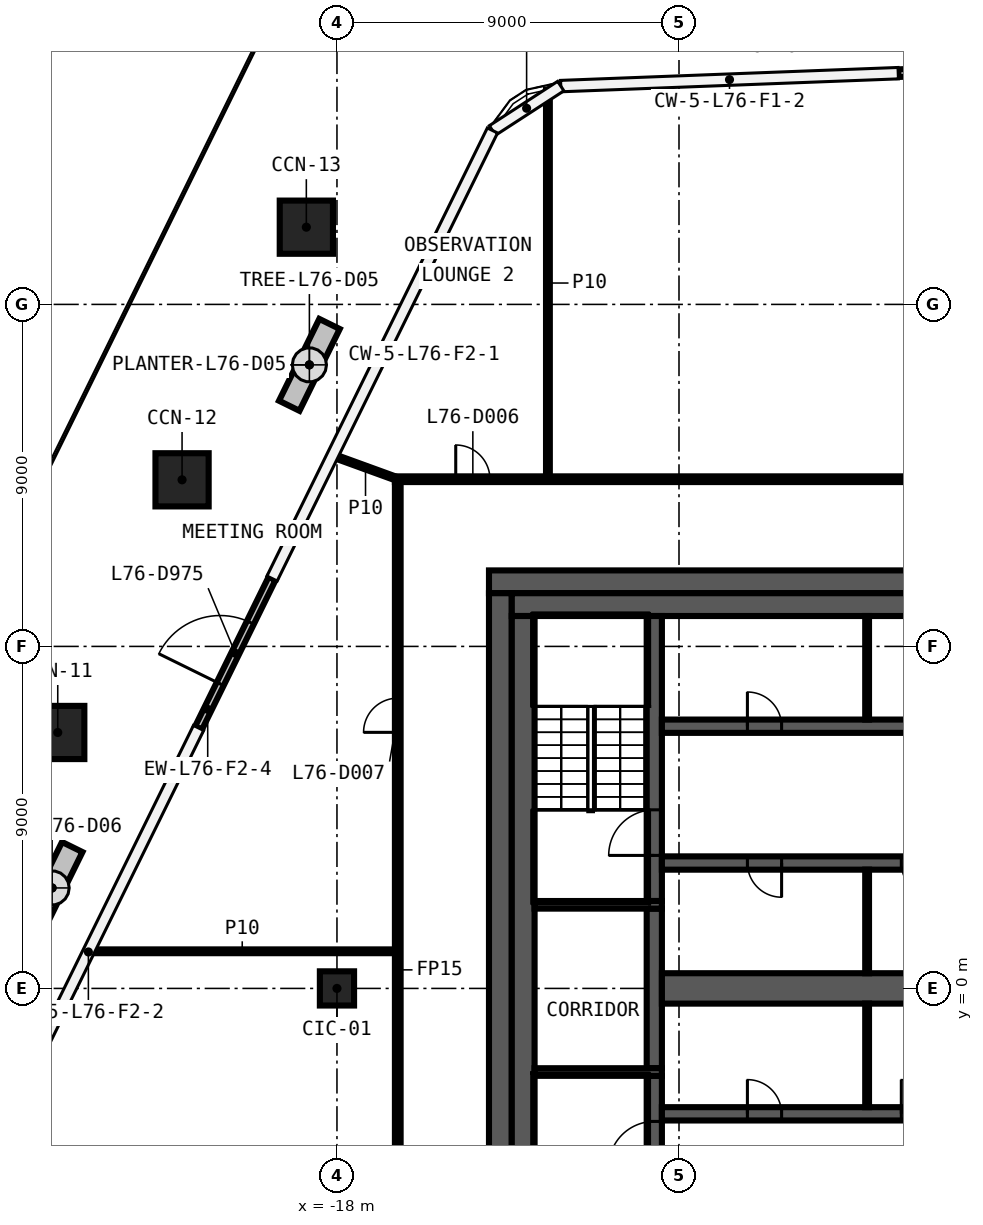
"""IFC4 building model, lengths in metres.
Left out: names, types, materials, properties, quantities, classifications, styles, units other than length and angle.
Written with IfcOpenShell. Run it as: python <this file> out.ifc"""

import sys

from ifc_helpers import new_model, si_unit, direction, frame, frame_2d, origin, origin_2d, place, context, subcontext, project, spatial, rectangle, hollow_rectangle, extrude, element, fill, save


model = new_model("IFC4")
c1 = context("Model", 3, precision=1e-05, world=origin(), true_north=direction((0.0, 1.0)))
c2 = subcontext(c1, "Body", "Model", "MODEL_VIEW")
j1 = project(units=[si_unit("LENGTHUNIT", "METRE"), si_unit("PLANEANGLEUNIT", "RADIAN")], contexts=[c1])
p1 = place(None, origin())
s1 = spatial("IfcSite", under=j1, at=p1, CompositionType="ELEMENT")
p2 = place(p1, origin())
s2 = spatial("IfcBuilding", under=s1, at=p2, CompositionType="ELEMENT")
p3 = place(p2, frame((0.0, 0.0, 353.0)))
s3 = spatial("IfcBuildingStorey", under=s2, at=p3, CompositionType="ELEMENT", Elevation=353.0)
p4 = place(p3, frame((-18.0, 0.0, 0.0), z_axis=(0.0, 0.0, 1.0), x_axis=(1.0, 0.0, 0.0)))
e1 = element("IfcColumn", 1, at=p4, inside=s3, PredefinedType="COLUMN", context=c2, shape_type="SweptSolid", body=[
    extrude(rectangle(XDim=0.9, YDim=0.9, at=origin_2d()), origin(), (0.0, 0.0, 1.0), 5.6),
])
for number, where, z_axis, x_axis in (
    (2, (-18.806, 20.032, 0.0), (0.0, 0.0, 1.0), (1.0, 0.0, 0.0)),
    (3, (-22.076, 13.384, 0.0), (0.0, 0.0, 1.0), (1.0, 0.0, 0.0)),
    (4, (-25.347, 6.735, 0.0), (0.0, 0.0, 1.0), (1.0, 0.0, 0.0)),
):
    element("IfcColumn", number, at=place(p3, frame(where, z_axis=z_axis, x_axis=x_axis)), inside=s3, PredefinedType="COLUMN", context=c2, shape_type="SweptSolid", body=[
        extrude(hollow_rectangle(XDim=1.4, YDim=1.4, WallThickness=0.06, at=origin_2d()), origin(), (0.0, 0.0, 1.0), 6.0),
    ])
p5 = place(p3, frame((-24.51, 0.977, 0.0), z_axis=(0.0, 0.0, 1.0), x_axis=(1.0, 0.0, 0.0)))
e5 = element("IfcWall", 5, at=p5, inside=s3, PredefinedType="PARTITIONING", context=c2, shape_type="SweptSolid", body=[
    extrude(rectangle(XDim=8.035, YDim=0.1, at=frame_2d((4.018, 0.0))), origin(), (0.0, 0.0, 1.0), 5.6),
])
p6 = place(p3, frame((-16.475, 13.4, 0.0), z_axis=(0.0, 0.0, 1.0), x_axis=(1.0, 0.0, 0.0)))
e6 = element("IfcWall", 6, at=p6, inside=s3, PredefinedType="PARTITIONING", context=c2, shape_type="SweptSolid", body=[
    extrude(rectangle(XDim=32.95, YDim=0.15, at=frame_2d((16.475, 0.0))), origin(), (0.0, 0.0, 1.0), 5.6),
])
p7 = place(p6, frame((16.926, 0.0, 0.0)))
e7 = element("IfcOpeningElement", 7, at=p7, cuts=e6, PredefinedType="OPENING", context=c2, shape_type="SweptSolid", body=[
    extrude(rectangle(XDim=0.9, YDim=2.1, at=frame_2d((0.45, 1.05))), frame((0.0, 0.085, 0.0), z_axis=(0.0, -1.0, 0.0), x_axis=(1.0, 0.0, 0.0)), (0.0, 0.0, 1.0), 0.17),
])
p8 = place(p6, frame((1.6, 0.0, 0.0)))
e8 = element("IfcOpeningElement", 8, at=p8, cuts=e6, PredefinedType="OPENING", context=c2, shape_type="SweptSolid", body=[
    extrude(rectangle(XDim=0.9, YDim=2.1, at=frame_2d((0.45, 1.05))), frame((0.0, 0.085, 0.0), z_axis=(0.0, -1.0, 0.0), x_axis=(1.0, 0.0, 0.0)), (0.0, 0.0, 1.0), 0.17),
])
p9 = place(p3, frame((-12.449, 13.475, 0.0), z_axis=(0.0, 0.0, 1.0), x_axis=(0.0, 1.0, 0.0)))
e9 = element("IfcWall", 9, at=p9, inside=s3, PredefinedType="PARTITIONING", context=c2, shape_type="SweptSolid", body=[
    extrude(rectangle(XDim=10.175, YDim=0.1, at=frame_2d((5.087, 0.0))), origin(), (0.0, 0.0, 1.0), 5.6),
])
p10 = place(p3, frame((-16.4, -13.325, 0.0), z_axis=(0.0, 0.0, 1.0), x_axis=(0.0, 1.0, 0.0)))
e10 = element("IfcWall", 10, at=p10, inside=s3, PredefinedType="PARTITIONING", context=c2, shape_type="SweptSolid", body=[
    extrude(rectangle(XDim=26.65, YDim=0.15, at=frame_2d((13.325, 0.0))), origin(), (0.0, 0.0, 1.0), 5.6),
])
p11 = place(p10, frame((6.664, 0.0, 0.0)))
e11 = element("IfcOpeningElement", 11, at=p11, cuts=e10, PredefinedType="OPENING", context=c2, shape_type="SweptSolid", body=[
    extrude(rectangle(XDim=0.9, YDim=2.1, at=frame_2d((0.45, 1.05))), frame((0.0, 0.085, 0.0), z_axis=(0.0, -1.0, 0.0), x_axis=(1.0, 0.0, 0.0)), (0.0, 0.0, 1.0), 0.17),
])
p12 = place(p10, frame((20.063, 0.0, 0.0)))
e12 = element("IfcOpeningElement", 12, at=p12, cuts=e10, PredefinedType="OPENING", context=c2, shape_type="SweptSolid", body=[
    extrude(rectangle(XDim=0.9, YDim=2.1, at=frame_2d((0.45, 1.05))), frame((0.0, 0.085, 0.0), z_axis=(0.0, -1.0, 0.0), x_axis=(1.0, 0.0, 0.0)), (0.0, 0.0, 1.0), 0.17),
])
p13 = place(p3, frame((-18.097, 14.016, 0.0), z_axis=(0.0, 0.0, 1.0), x_axis=(0.939892096891, -0.341471589158, 0.0)))
e13 = element("IfcWall", 13, at=p13, inside=s3, PredefinedType="PARTITIONING", context=c2, shape_type="SweptSolid", body=[
    extrude(rectangle(XDim=1.805, YDim=0.1, at=frame_2d((0.903, 0.0))), origin(), (0.0, 0.0, 1.0), 5.6),
])
p14 = place(p3, frame((-3.231, 24.085, 0.0), z_axis=(0.0, 0.0, 1.0), x_axis=(0.999267728071, 0.038262352715, 0.0)))
e14 = element("IfcWall", 14, at=p14, inside=s3, PredefinedType="SOLIDWALL", context=c2, shape_type="SweptSolid", body=[
    extrude(rectangle(XDim=4.447, YDim=0.2, at=frame_2d((2.224, 0.0))), origin(), (0.0, 0.0, 1.0), 5.6),
])
p15 = place(p14, frame((1.324, 0.0, 0.0)))
e15 = element("IfcOpeningElement", 15, at=p15, cuts=e14, PredefinedType="OPENING", context=c2, shape_type="SweptSolid", body=[
    extrude(rectangle(XDim=1.8, YDim=2.4, at=frame_2d((0.9, 1.2))), frame((0.0, 0.11, 0.0), z_axis=(0.0, -1.0, 0.0), x_axis=(1.0, 0.0, 0.0)), (0.0, 0.0, 1.0), 0.22),
])
p16 = place(p3, frame((-21.642, 6.854, 0.0), z_axis=(0.0, 0.0, 1.0), x_axis=(0.441343921146, 0.897338031774, 0.0)))
e16 = element("IfcWall", 16, at=p16, inside=s3, PredefinedType="SOLIDWALL", context=c2, shape_type="SweptSolid", body=[
    extrude(rectangle(XDim=4.383, YDim=0.2, at=frame_2d((2.191, 0.0))), origin(), (0.0, 0.0, 1.0), 5.6),
])
p17 = place(p16, frame((1.291, 0.0, 0.0)))
e17 = element("IfcOpeningElement", 17, at=p17, cuts=e16, PredefinedType="OPENING", context=c2, shape_type="SweptSolid", body=[
    extrude(rectangle(XDim=1.8, YDim=2.4, at=frame_2d((0.9, 1.2))), frame((0.0, 0.11, 0.0), z_axis=(0.0, -1.0, 0.0), x_axis=(1.0, 0.0, 0.0)), (0.0, 0.0, 1.0), 0.22),
])
for number, where, z_axis, x_axis in (
    (18, (-18.196, 17.486, 0.0), (0.0, 0.0, 1.0), (-0.441, -0.897, 0.0)),
    (19, (-24.966, 3.721, 0.0), (0.0, 0.0, 1.0), (-0.441, -0.897, 0.0)),
):
    element("IfcWall", number, at=place(p3, frame(where, z_axis=z_axis, x_axis=x_axis)), inside=s3, PredefinedType="SOLIDWALL", context=c2, shape_type="SweptSolid", body=[
        extrude(rectangle(XDim=2.4, YDim=0.6, at=frame_2d((1.2, 0.0))), origin(), (0.0, 0.0, 1.0), 0.42),
    ])
p18 = place(p3, frame((-14.0, 10.7, 0.0), z_axis=(0.0, 0.0, 1.0), x_axis=(1.0, 0.0, 0.0)))
e20 = element("IfcWall", 20, at=p18, inside=s3, PredefinedType="SHEAR", context=c2, shape_type="SweptSolid", body=[
    extrude(rectangle(XDim=28.0, YDim=0.6, at=frame_2d((14.0, 0.0))), origin(), (0.0, 0.0, 1.0), 5.6),
])
p19 = place(p18, frame((15.9, 0.0, 0.0)))
e21 = element("IfcOpeningElement", 21, at=p19, cuts=e20, PredefinedType="OPENING", context=c2, shape_type="SweptSolid", body=[
    extrude(rectangle(XDim=1.6, YDim=2.1, at=frame_2d((0.8, 1.05))), frame((0.0, 0.31, 0.0), z_axis=(0.0, -1.0, 0.0), x_axis=(1.0, 0.0, 0.0)), (0.0, 0.0, 1.0), 0.62),
])
p20 = place(p3, frame((-13.7, -10.4, 0.0), z_axis=(0.0, 0.0, 1.0), x_axis=(0.0, 1.0, 0.0)))
e22 = element("IfcWall", 22, at=p20, inside=s3, PredefinedType="SHEAR", context=c2, shape_type="SweptSolid", body=[
    extrude(rectangle(XDim=20.8, YDim=0.6, at=frame_2d((10.4, 0.0))), origin(), (0.0, 0.0, 1.0), 5.6),
])
p21 = place(p3, frame((-13.4, 10.1, 0.0), z_axis=(0.0, 0.0, 1.0), x_axis=(1.0, 0.0, 0.0)))
e23 = element("IfcWall", 23, at=p21, inside=s3, PredefinedType="SHEAR", context=c2, shape_type="SweptSolid", body=[
    extrude(rectangle(XDim=14.9, YDim=0.6, at=frame_2d((7.45, 0.0))), origin(), (0.0, 0.0, 1.0), 5.6),
])
p22 = place(p3, frame((-13.1, -9.8, 0.0), z_axis=(0.0, 0.0, 1.0), x_axis=(0.0, 1.0, 0.0)))
e24 = element("IfcWall", 24, at=p22, inside=s3, PredefinedType="SHEAR", context=c2, shape_type="SweptSolid", body=[
    extrude(rectangle(XDim=19.6, YDim=0.6, at=frame_2d((9.8, 0.0))), origin(), (0.0, 0.0, 1.0), 5.6),
])
p23 = place(p3, frame((-9.65, -9.8, 0.0), z_axis=(0.0, 0.0, 1.0), x_axis=(0.0, 1.0, 0.0)))
e25 = element("IfcWall", 25, at=p23, inside=s3, PredefinedType="SHEAR", context=c2, shape_type="SweptSolid", body=[
    extrude(rectangle(XDim=7.5, YDim=0.4, at=frame_2d((3.75, 0.0))), origin(), (0.0, 0.0, 1.0), 5.6),
])
p24 = place(p23, frame((5.1, 0.0, 0.0)))
e26 = element("IfcOpeningElement", 26, at=p24, cuts=e25, PredefinedType="OPENING", context=c2, shape_type="SweptSolid", body=[
    extrude(rectangle(XDim=1.2, YDim=2.1, at=frame_2d((0.6, 1.05))), frame((0.0, 0.21, 0.0), z_axis=(0.0, -1.0, 0.0), x_axis=(1.0, 0.0, 0.0)), (0.0, 0.0, 1.0), 0.42),
])
p25 = place(p3, frame((-9.65, -2.1, 0.0), z_axis=(0.0, 0.0, 1.0), x_axis=(0.0, 1.0, 0.0)))
e27 = element("IfcWall", 27, at=p25, inside=s3, PredefinedType="SHEAR", context=c2, shape_type="SweptSolid", body=[
    extrude(rectangle(XDim=4.2, YDim=0.4, at=frame_2d((2.1, 0.0))), origin(), (0.0, 0.0, 1.0), 5.6),
])
p26 = place(p3, frame((-9.65, 2.3, 0.0), z_axis=(0.0, 0.0, 1.0), x_axis=(0.0, 1.0, 0.0)))
e28 = element("IfcWall", 28, at=p26, inside=s3, PredefinedType="SHEAR", context=c2, shape_type="SweptSolid", body=[
    extrude(rectangle(XDim=7.5, YDim=0.4, at=frame_2d((3.75, 0.0))), origin(), (0.0, 0.0, 1.0), 5.6),
])
p27 = place(p26, frame((1.2, 0.0, 0.0)))
e29 = element("IfcOpeningElement", 29, at=p27, cuts=e28, PredefinedType="OPENING", context=c2, shape_type="SweptSolid", body=[
    extrude(rectangle(XDim=1.2, YDim=2.1, at=frame_2d((0.6, 1.05))), frame((0.0, 0.21, 0.0), z_axis=(0.0, -1.0, 0.0), x_axis=(1.0, 0.0, 0.0)), (0.0, 0.0, 1.0), 0.42),
])
for number, where, z_axis, x_axis in (
    (30, (-9.45, 2.2, 0.0), (0.0, 0.0, 1.0), (-1.0, 0.0, 0.0)),
    (31, (-9.45, -2.2, 0.0), (0.0, 0.0, 1.0), (-1.0, 0.0, 0.0)),
):
    element("IfcWall", number, at=place(p3, frame(where, z_axis=z_axis, x_axis=x_axis)), inside=s3, PredefinedType="SHEAR", context=c2, shape_type="SweptSolid", body=[
        extrude(rectangle(XDim=3.35, YDim=0.2, at=frame_2d((1.675, 0.0))), origin(), (0.0, 0.0, 1.0), 5.6),
    ])
p28 = place(p3, frame((-9.45, 6.9, 0.0), z_axis=(0.0, 0.0, 1.0), x_axis=(1.0, 0.0, 0.0)))
e32 = element("IfcWall", 32, at=p28, inside=s3, PredefinedType="SHEAR", context=c2, shape_type="SweptSolid", body=[
    extrude(rectangle(XDim=18.9, YDim=0.35, at=frame_2d((9.45, 0.0))), origin(), (0.0, 0.0, 1.0), 5.6),
])
p29 = place(p28, frame((11.55, 0.0, 0.0)))
e33 = element("IfcOpeningElement", 33, at=p29, cuts=e32, PredefinedType="OPENING", context=c2, shape_type="SweptSolid", body=[
    extrude(rectangle(XDim=1.2, YDim=2.1, at=frame_2d((0.6, 1.05))), frame((0.0, 0.185, 0.0), z_axis=(0.0, -1.0, 0.0), x_axis=(1.0, 0.0, 0.0)), (0.0, 0.0, 1.0), 0.37),
])
p30 = place(p28, frame((14.3, 0.0, 0.0)))
e34 = element("IfcOpeningElement", 34, at=p30, cuts=e32, PredefinedType="OPENING", context=c2, shape_type="SweptSolid", body=[
    extrude(rectangle(XDim=1.1, YDim=2.1, at=frame_2d((0.55, 1.05))), frame((0.0, 0.185, 0.0), z_axis=(0.0, -1.0, 0.0), x_axis=(1.0, 0.0, 0.0)), (0.0, 0.0, 1.0), 0.37),
])
p31 = place(p28, frame((17.0, 0.0, 0.0)))
e35 = element("IfcOpeningElement", 35, at=p31, cuts=e32, PredefinedType="OPENING", context=c2, shape_type="SweptSolid", body=[
    extrude(rectangle(XDim=1.1, YDim=2.1, at=frame_2d((0.55, 1.05))), frame((0.0, 0.185, 0.0), z_axis=(0.0, -1.0, 0.0), x_axis=(1.0, 0.0, 0.0)), (0.0, 0.0, 1.0), 0.37),
])
p32 = place(p28, frame((2.25, 0.0, 0.0)))
e36 = element("IfcOpeningElement", 36, at=p32, cuts=e32, PredefinedType="OPENING", context=c2, shape_type="SweptSolid", body=[
    extrude(rectangle(XDim=0.9, YDim=2.1, at=frame_2d((0.45, 1.05))), frame((0.0, 0.185, 0.0), z_axis=(0.0, -1.0, 0.0), x_axis=(1.0, 0.0, 0.0)), (0.0, 0.0, 1.0), 0.37),
])
p33 = place(p28, frame((7.65, 0.0, 0.0)))
e37 = element("IfcOpeningElement", 37, at=p33, cuts=e32, PredefinedType="OPENING", context=c2, shape_type="SweptSolid", body=[
    extrude(rectangle(XDim=0.9, YDim=2.1, at=frame_2d((0.45, 1.05))), frame((0.0, 0.185, 0.0), z_axis=(0.0, -1.0, 0.0), x_axis=(1.0, 0.0, 0.0)), (0.0, 0.0, 1.0), 0.37),
])
p34 = place(p3, frame((9.45, 3.3, 0.0), z_axis=(0.0, 0.0, 1.0), x_axis=(-1.0, 0.0, 0.0)))
e38 = element("IfcWall", 38, at=p34, inside=s3, PredefinedType="SHEAR", context=c2, shape_type="SweptSolid", body=[
    extrude(rectangle(XDim=18.9, YDim=0.35, at=frame_2d((9.45, 0.0))), origin(), (0.0, 0.0, 1.0), 5.6),
])
p35 = place(p34, frame((6.2, 0.0, 0.0)))
e39 = element("IfcOpeningElement", 39, at=p35, cuts=e38, PredefinedType="OPENING", context=c2, shape_type="SweptSolid", body=[
    extrude(rectangle(XDim=1.1, YDim=2.1, at=frame_2d((0.55, 1.05))), frame((0.0, 0.185, 0.0), z_axis=(0.0, -1.0, 0.0), x_axis=(1.0, 0.0, 0.0)), (0.0, 0.0, 1.0), 0.37),
])
p36 = place(p34, frame((3.5, 0.0, 0.0)))
e40 = element("IfcOpeningElement", 40, at=p36, cuts=e38, PredefinedType="OPENING", context=c2, shape_type="SweptSolid", body=[
    extrude(rectangle(XDim=1.1, YDim=2.1, at=frame_2d((0.55, 1.05))), frame((0.0, 0.185, 0.0), z_axis=(0.0, -1.0, 0.0), x_axis=(1.0, 0.0, 0.0)), (0.0, 0.0, 1.0), 0.37),
])
p37 = place(p34, frame((0.9, 0.0, 0.0)))
e41 = element("IfcOpeningElement", 41, at=p37, cuts=e38, PredefinedType="OPENING", context=c2, shape_type="SweptSolid", body=[
    extrude(rectangle(XDim=0.9, YDim=2.1, at=frame_2d((0.45, 1.05))), frame((0.0, 0.185, 0.0), z_axis=(0.0, -1.0, 0.0), x_axis=(1.0, 0.0, 0.0)), (0.0, 0.0, 1.0), 0.37),
])
p38 = place(p34, frame((15.75, 0.0, 0.0)))
e42 = element("IfcOpeningElement", 42, at=p38, cuts=e38, PredefinedType="OPENING", context=c2, shape_type="SweptSolid", body=[
    extrude(rectangle(XDim=0.9, YDim=2.1, at=frame_2d((0.45, 1.05))), frame((0.0, 0.185, 0.0), z_axis=(0.0, -1.0, 0.0), x_axis=(1.0, 0.0, 0.0)), (0.0, 0.0, 1.0), 0.37),
])
p39 = place(p34, frame((11.7, 0.0, 0.0)))
e43 = element("IfcOpeningElement", 43, at=p39, cuts=e38, PredefinedType="OPENING", context=c2, shape_type="SweptSolid", body=[
    extrude(rectangle(XDim=0.9, YDim=2.1, at=frame_2d((0.45, 1.05))), frame((0.0, 0.185, 0.0), z_axis=(0.0, -1.0, 0.0), x_axis=(1.0, 0.0, 0.0)), (0.0, 0.0, 1.0), 0.37),
])
p40 = place(p34, frame((9.0, 0.0, 0.0)))
e44 = element("IfcOpeningElement", 44, at=p40, cuts=e38, PredefinedType="OPENING", context=c2, shape_type="SweptSolid", body=[
    extrude(rectangle(XDim=0.9, YDim=2.1, at=frame_2d((0.45, 1.05))), frame((0.0, 0.185, 0.0), z_axis=(0.0, -1.0, 0.0), x_axis=(1.0, 0.0, 0.0)), (0.0, 0.0, 1.0), 0.37),
])
p41 = place(p3, frame((-9.45, -3.3, 0.0), z_axis=(0.0, 0.0, 1.0), x_axis=(1.0, 0.0, 0.0)))
e45 = element("IfcWall", 45, at=p41, inside=s3, PredefinedType="SHEAR", context=c2, shape_type="SweptSolid", body=[
    extrude(rectangle(XDim=18.9, YDim=0.35, at=frame_2d((9.45, 0.0))), origin(), (0.0, 0.0, 1.0), 5.6),
])
p42 = place(p41, frame((17.0, 0.0, 0.0)))
e46 = element("IfcOpeningElement", 46, at=p42, cuts=e45, PredefinedType="OPENING", context=c2, shape_type="SweptSolid", body=[
    extrude(rectangle(XDim=1.1, YDim=2.1, at=frame_2d((0.55, 1.05))), frame((0.0, 0.185, 0.0), z_axis=(0.0, -1.0, 0.0), x_axis=(1.0, 0.0, 0.0)), (0.0, 0.0, 1.0), 0.37),
])
p43 = place(p41, frame((2.25, 0.0, 0.0)))
e47 = element("IfcOpeningElement", 47, at=p43, cuts=e45, PredefinedType="OPENING", context=c2, shape_type="SweptSolid", body=[
    extrude(rectangle(XDim=0.9, YDim=2.1, at=frame_2d((0.45, 1.05))), frame((0.0, 0.185, 0.0), z_axis=(0.0, -1.0, 0.0), x_axis=(1.0, 0.0, 0.0)), (0.0, 0.0, 1.0), 0.37),
])
p44 = place(p41, frame((6.3, 0.0, 0.0)))
e48 = element("IfcOpeningElement", 48, at=p44, cuts=e45, PredefinedType="OPENING", context=c2, shape_type="SweptSolid", body=[
    extrude(rectangle(XDim=0.9, YDim=2.1, at=frame_2d((0.45, 1.05))), frame((0.0, 0.185, 0.0), z_axis=(0.0, -1.0, 0.0), x_axis=(1.0, 0.0, 0.0)), (0.0, 0.0, 1.0), 0.37),
])
p45 = place(p41, frame((10.35, 0.0, 0.0)))
e49 = element("IfcOpeningElement", 49, at=p45, cuts=e45, PredefinedType="OPENING", context=c2, shape_type="SweptSolid", body=[
    extrude(rectangle(XDim=0.9, YDim=2.1, at=frame_2d((0.45, 1.05))), frame((0.0, 0.185, 0.0), z_axis=(0.0, -1.0, 0.0), x_axis=(1.0, 0.0, 0.0)), (0.0, 0.0, 1.0), 0.37),
])
p46 = place(p41, frame((14.4, 0.0, 0.0)))
e50 = element("IfcOpeningElement", 50, at=p46, cuts=e45, PredefinedType="OPENING", context=c2, shape_type="SweptSolid", body=[
    extrude(rectangle(XDim=0.9, YDim=2.1, at=frame_2d((0.45, 1.05))), frame((0.0, 0.185, 0.0), z_axis=(0.0, -1.0, 0.0), x_axis=(1.0, 0.0, 0.0)), (0.0, 0.0, 1.0), 0.37),
])
p47 = place(p3, frame((-9.45, 0.0, 0.0), z_axis=(0.0, 0.0, 1.0), x_axis=(1.0, 0.0, 0.0)))
e51 = element("IfcWall", 51, at=p47, inside=s3, PredefinedType="SHEAR", context=c2, shape_type="SweptSolid", body=[
    extrude(rectangle(XDim=18.9, YDim=0.8, at=frame_2d((9.45, 0.0))), origin(), (0.0, 0.0, 1.0), 5.6),
])
for number, where, z_axis, x_axis in (
    (52, (-4.05, -3.125, 0.0), (0.0, 0.0, 1.0), (0.0, 1.0, 0.0)),
    (53, (-4.05, 0.4, 0.0), (0.0, 0.0, 1.0), (0.0, 1.0, 0.0)),
    (54, (-4.05, 7.075, 0.0), (0.0, 0.0, 1.0), (0.0, 1.0, 0.0)),
):
    element("IfcWall", number, at=place(p3, frame(where, z_axis=z_axis, x_axis=x_axis)), inside=s3, PredefinedType="PARTITIONING", context=c2, shape_type="SweptSolid", body=[
        extrude(rectangle(XDim=2.725, YDim=0.1, at=frame_2d((1.363, 0.0))), origin(), (0.0, 0.0, 1.0), 5.6),
    ])
p48 = place(p8, origin())
e55 = element("IfcDoor", 55, at=p48, inside=s3, OperationType="SINGLE_SWING_LEFT", PredefinedType="DOOR", context=c2, shape_type="SweptSolid", body=[
    extrude(rectangle(XDim=0.9, YDim=2.1, at=frame_2d((0.45, 1.05))), frame((0.0, 0.025, 0.0), z_axis=(0.0, -1.0, 0.0), x_axis=(1.0, 0.0, 0.0)), (0.0, 0.0, 1.0), 0.05),
])
fill(e8, e55)
p49 = place(p12, origin())
e56 = element("IfcDoor", 56, at=p49, inside=s3, OperationType="SINGLE_SWING_RIGHT", PredefinedType="DOOR", context=c2, shape_type="SweptSolid", body=[
    extrude(rectangle(XDim=0.9, YDim=2.1, at=frame_2d((0.45, 1.05))), frame((0.0, 0.025, 0.0), z_axis=(0.0, -1.0, 0.0), x_axis=(1.0, 0.0, 0.0)), (0.0, 0.0, 1.0), 0.05),
])
fill(e12, e56)
p50 = place(p17, origin())
e57 = element("IfcDoor", 57, at=p50, inside=s3, OperationType="SINGLE_SWING_LEFT", PredefinedType="DOOR", context=c2, shape_type="SweptSolid", body=[
    extrude(rectangle(XDim=1.8, YDim=2.4, at=frame_2d((0.9, 1.2))), frame((0.0, 0.025, 0.0), z_axis=(0.0, -1.0, 0.0), x_axis=(1.0, 0.0, 0.0)), (0.0, 0.0, 1.0), 0.05),
])
fill(e17, e57)
p51 = place(p32, origin())
e58 = element("IfcDoor", 58, at=p51, inside=s3, OperationType="SINGLE_SWING_RIGHT", PredefinedType="DOOR", context=c2, shape_type="SweptSolid", body=[
    extrude(rectangle(XDim=0.9, YDim=2.1, at=frame_2d((0.45, 1.05))), frame((0.0, 0.025, 0.0), z_axis=(0.0, -1.0, 0.0), x_axis=(1.0, 0.0, 0.0)), (0.0, 0.0, 1.0), 0.05),
])
fill(e36, e58)
p52 = place(p38, origin())
e59 = element("IfcDoor", 59, at=p52, inside=s3, OperationType="SINGLE_SWING_RIGHT", PredefinedType="DOOR", context=c2, shape_type="SweptSolid", body=[
    extrude(rectangle(XDim=0.9, YDim=2.1, at=frame_2d((0.45, 1.05))), frame((0.0, 0.025, 0.0), z_axis=(0.0, -1.0, 0.0), x_axis=(1.0, 0.0, 0.0)), (0.0, 0.0, 1.0), 0.05),
])
fill(e42, e59)
p53 = place(p39, origin())
e60 = element("IfcDoor", 60, at=p53, inside=s3, OperationType="SINGLE_SWING_LEFT", PredefinedType="DOOR", context=c2, shape_type="SweptSolid", body=[
    extrude(rectangle(XDim=0.9, YDim=2.1, at=frame_2d((0.45, 1.05))), frame((0.0, 0.025, 0.0), z_axis=(0.0, -1.0, 0.0), x_axis=(1.0, 0.0, 0.0)), (0.0, 0.0, 1.0), 0.05),
])
fill(e43, e60)
p54 = place(p43, origin())
e61 = element("IfcDoor", 61, at=p54, inside=s3, OperationType="SINGLE_SWING_LEFT", PredefinedType="DOOR", context=c2, shape_type="SweptSolid", body=[
    extrude(rectangle(XDim=0.9, YDim=2.1, at=frame_2d((0.45, 1.05))), frame((0.0, 0.025, 0.0), z_axis=(0.0, -1.0, 0.0), x_axis=(1.0, 0.0, 0.0)), (0.0, 0.0, 1.0), 0.05),
])
fill(e47, e61)
p55 = place(p44, origin())
e62 = element("IfcDoor", 62, at=p55, inside=s3, OperationType="SINGLE_SWING_RIGHT", PredefinedType="DOOR", context=c2, shape_type="SweptSolid", body=[
    extrude(rectangle(XDim=0.9, YDim=2.1, at=frame_2d((0.45, 1.05))), frame((0.0, 0.025, 0.0), z_axis=(0.0, -1.0, 0.0), x_axis=(1.0, 0.0, 0.0)), (0.0, 0.0, 1.0), 0.05),
])
fill(e48, e62)
p56 = place(p27, origin())
e63 = element("IfcDoor", 63, at=p56, inside=s3, OperationType="SINGLE_SWING_RIGHT", PredefinedType="DOOR", context=c2, shape_type="SweptSolid", body=[
    extrude(rectangle(XDim=1.2, YDim=2.1, at=frame_2d((0.6, 1.05))), frame((0.0, 0.025, 0.0), z_axis=(0.0, -1.0, 0.0), x_axis=(1.0, 0.0, 0.0)), (0.0, 0.0, 1.0), 0.05),
])
fill(e29, e63)
p57 = place(p24, origin())
e64 = element("IfcDoor", 64, at=p57, inside=s3, OperationType="SINGLE_SWING_LEFT", PredefinedType="DOOR", context=c2, shape_type="SweptSolid", body=[
    extrude(rectangle(XDim=1.2, YDim=2.1, at=frame_2d((0.6, 1.05))), frame((0.0, 0.025, 0.0), z_axis=(0.0, -1.0, 0.0), x_axis=(1.0, 0.0, 0.0)), (0.0, 0.0, 1.0), 0.05),
])
fill(e26, e64)
save(model, sys.argv[1])
